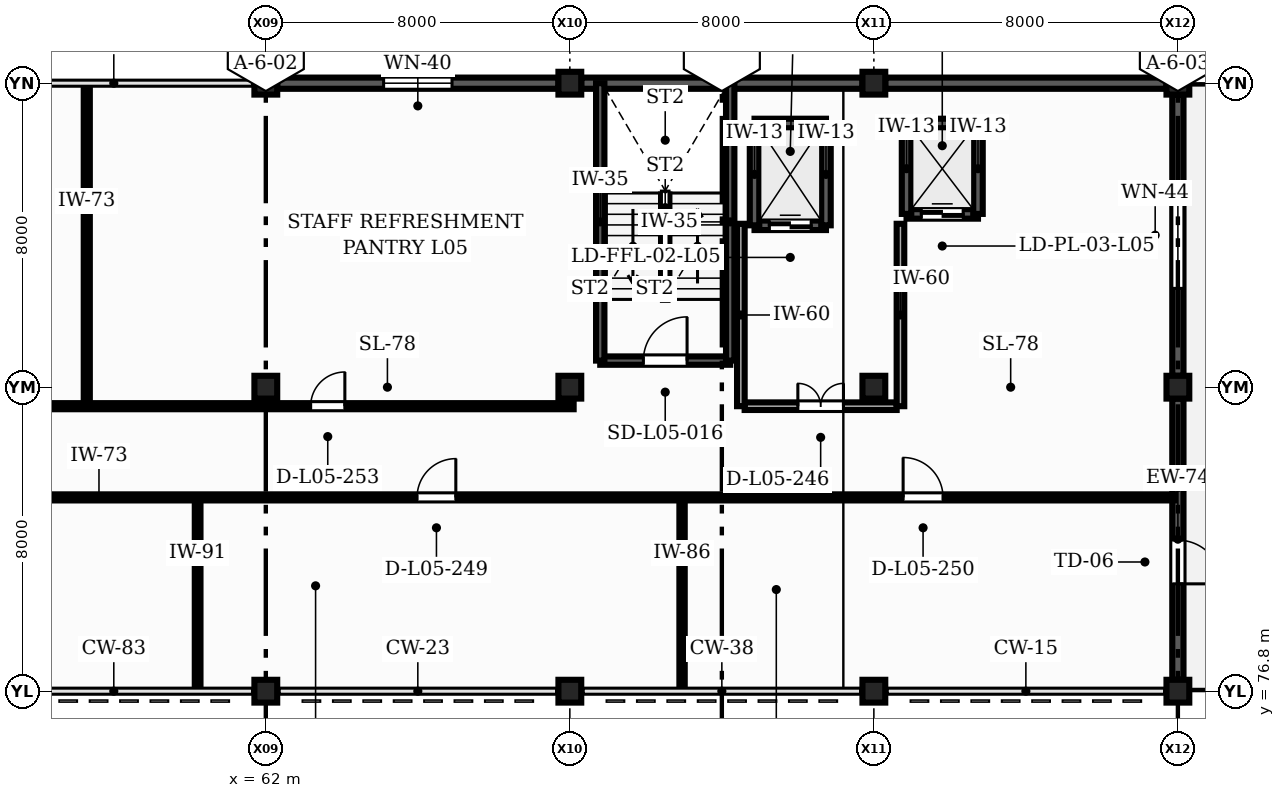
"""IFC4 building model, lengths in metres.
Left out: names, types, materials, properties, quantities, classifications, styles, units other than length and angle.
Written with IfcOpenShell. Run it as: python <this file> out.ifc"""

import sys

from ifc_helpers import new_model, si_unit, direction, frame, frame_2d, origin, origin_2d, place, context, subcontext, project, spatial, rectangle, extrude, element, fill, save


model = new_model("IFC4")
c1 = context("Model", 3, precision=1e-05, world=origin(), true_north=direction((0.0, 1.0)))
c2 = subcontext(c1, "Body", "Model", "MODEL_VIEW")
j1 = project(units=[si_unit("LENGTHUNIT", "METRE"), si_unit("PLANEANGLEUNIT", "RADIAN")], contexts=[c1])
p1 = place(None, origin())
s1 = spatial("IfcSite", under=j1, at=p1, CompositionType="ELEMENT")
p2 = place(p1, origin())
s2 = spatial("IfcBuilding", under=s1, at=p2, CompositionType="ELEMENT")
p3 = place(p2, frame((0.0, 0.0, 21.9)))
s3 = spatial("IfcBuildingStorey", under=s2, at=p3, CompositionType="ELEMENT", Elevation=21.9)
for number, where, z_axis, x_axis in (
    (1, (62.0, 76.8, 0.0), (0.0, 0.0, 1.0), (1.0, 0.0, 0.0)),
    (2, (62.0, 84.8, 0.0), (0.0, 0.0, 1.0), (1.0, 0.0, 0.0)),
    (3, (62.0, 92.8, 0.0), (0.0, 0.0, 1.0), (1.0, 0.0, 0.0)),
    (4, (70.0, 76.8, 0.0), (0.0, 0.0, 1.0), (1.0, 0.0, 0.0)),
    (5, (70.0, 84.8, 0.0), (0.0, 0.0, 1.0), (1.0, 0.0, 0.0)),
    (6, (70.0, 92.8, 0.0), (0.0, 0.0, 1.0), (1.0, 0.0, 0.0)),
    (7, (78.0, 76.8, 0.0), (0.0, 0.0, 1.0), (1.0, 0.0, 0.0)),
    (8, (78.0, 84.8, 0.0), (0.0, 0.0, 1.0), (1.0, 0.0, 0.0)),
    (9, (78.0, 92.8, 0.0), (0.0, 0.0, 1.0), (1.0, 0.0, 0.0)),
    (10, (86.0, 76.8, 0.0), (0.0, 0.0, 1.0), (1.0, 0.0, 0.0)),
    (11, (86.0, 84.8, 0.0), (0.0, 0.0, 1.0), (1.0, 0.0, 0.0)),
    (12, (86.0, 92.8, 0.0), (0.0, 0.0, 1.0), (1.0, 0.0, 0.0)),
):
    element("IfcColumn", number, at=place(p3, frame(where, z_axis=z_axis, x_axis=x_axis)), inside=s3, PredefinedType="COLUMN", context=c2, shape_type="SweptSolid", body=[
        extrude(rectangle(XDim=0.6, YDim=0.6, at=origin_2d()), origin(), (0.0, 0.0, 1.0), 3.9),
    ])
p4 = place(p3, frame((86.0, 77.1, 0.0), z_axis=(0.0, 0.0, 1.0), x_axis=(0.0, 1.0, 0.0)))
e13 = element("IfcWall", 13, at=p4, inside=s3, PredefinedType="SOLIDWALL", context=c2, shape_type="SweptSolid", body=[
    extrude(rectangle(XDim=7.4, YDim=0.295, at=frame_2d((3.7, 0.0))), origin(), (0.0, 0.0, 1.0), 3.0),
])
p5 = place(p4, frame((2.525, 0.0, 0.0)))
e14 = element("IfcOpeningElement", 14, at=p5, cuts=e13, PredefinedType="OPENING", context=c2, shape_type="SweptSolid", body=[
    extrude(rectangle(XDim=1.15, YDim=2.15, at=frame_2d((0.575, 1.075))), frame((0.0, 0.157, 0.0), z_axis=(0.0, -1.0, 0.0), x_axis=(1.0, 0.0, 0.0)), (0.0, 0.0, 1.0), 0.315),
])
p6 = place(p3, frame((86.0, 85.1, 0.0), z_axis=(0.0, 0.0, 1.0), x_axis=(0.0, 1.0, 0.0)))
e15 = element("IfcWall", 15, at=p6, inside=s3, PredefinedType="SOLIDWALL", context=c2, shape_type="SweptSolid", body=[
    extrude(rectangle(XDim=7.4, YDim=0.295, at=frame_2d((3.7, 0.0))), origin(), (0.0, 0.0, 1.0), 3.0),
])
p7 = place(p6, frame((2.3, 0.0, 0.9)))
e16 = element("IfcOpeningElement", 16, at=p7, cuts=e15, PredefinedType="OPENING", context=c2, shape_type="SweptSolid", body=[
    extrude(rectangle(XDim=2.8, YDim=1.8, at=frame_2d((1.4, 0.9))), frame((0.0, 0.157, 0.0), z_axis=(0.0, -1.0, 0.0), x_axis=(1.0, 0.0, 0.0)), (0.0, 0.0, 1.0), 0.315),
])
p8 = place(p3, frame((85.7, 92.8, 0.0), z_axis=(0.0, 0.0, 1.0), x_axis=(-1.0, 0.0, 0.0)))
e17 = element("IfcWall", 17, at=p8, inside=s3, PredefinedType="SOLIDWALL", context=c2, shape_type="SweptSolid", body=[
    extrude(rectangle(XDim=7.4, YDim=0.295, at=frame_2d((3.7, 0.0))), origin(), (0.0, 0.0, 1.0), 3.0),
])
p9 = place(p3, frame((77.7, 92.8, 0.0), z_axis=(0.0, 0.0, 1.0), x_axis=(-1.0, 0.0, 0.0)))
e18 = element("IfcWall", 18, at=p9, inside=s3, PredefinedType="SOLIDWALL", context=c2, shape_type="SweptSolid", body=[
    extrude(rectangle(XDim=7.4, YDim=0.295, at=frame_2d((3.7, 0.0))), origin(), (0.0, 0.0, 1.0), 3.65),
])
p10 = place(p3, frame((69.7, 92.8, 0.0), z_axis=(0.0, 0.0, 1.0), x_axis=(-1.0, 0.0, 0.0)))
e19 = element("IfcWall", 19, at=p10, inside=s3, PredefinedType="SOLIDWALL", context=c2, shape_type="SweptSolid", body=[
    extrude(rectangle(XDim=7.4, YDim=0.295, at=frame_2d((3.7, 0.0))), origin(), (0.0, 0.0, 1.0), 3.0),
])
p11 = place(p10, frame((2.8, 0.0, 1.6)))
e20 = element("IfcOpeningElement", 20, at=p11, cuts=e19, PredefinedType="OPENING", context=c2, shape_type="SweptSolid", body=[
    extrude(rectangle(XDim=1.8, YDim=0.75, at=frame_2d((0.9, 0.375))), frame((0.0, 0.157, 0.0), z_axis=(0.0, -1.0, 0.0), x_axis=(1.0, 0.0, 0.0)), (0.0, 0.0, 1.0), 0.315),
])
p12 = place(p3, frame((70.8, 85.5, 0.0), z_axis=(0.0, 0.0, 1.0), x_axis=(1.0, 0.0, 0.0)))
e21 = element("IfcWall", 21, at=p12, inside=s3, PredefinedType="SHEAR", context=c2, shape_type="SweptSolid", body=[
    extrude(rectangle(XDim=3.42, YDim=0.22, at=frame_2d((1.71, 0.0))), origin(), (0.0, 0.0, 1.0), 3.9),
])
p13 = place(p12, frame((1.135, 0.0, 0.0)))
e22 = element("IfcOpeningElement", 22, at=p13, cuts=e21, PredefinedType="OPENING", context=c2, shape_type="SweptSolid", body=[
    extrude(rectangle(XDim=1.15, YDim=2.15, at=frame_2d((0.575, 1.075))), frame((0.0, 0.12, 0.0), z_axis=(0.0, -1.0, 0.0), x_axis=(1.0, 0.0, 0.0)), (0.0, 0.0, 1.0), 0.24),
])
for number, where, z_axis, x_axis in (
    (23, (74.22, 85.5, 0.0), (0.0, 0.0, 1.0), (0.0, 1.0, 0.0)),
    (24, (70.8, 92.8, 0.0), (0.0, 0.0, 1.0), (0.0, -1.0, 0.0)),
):
    element("IfcWall", number, at=place(p3, frame(where, z_axis=z_axis, x_axis=x_axis)), inside=s3, PredefinedType="SHEAR", context=c2, shape_type="SweptSolid", body=[
        extrude(rectangle(XDim=7.3, YDim=0.22, at=frame_2d((3.65, 0.0))), origin(), (0.0, 0.0, 1.0), 3.9),
    ])
p14 = place(p3, frame((74.86, 89.06, 0.0), z_axis=(0.0, 0.0, 1.0), x_axis=(1.0, 0.0, 0.0)))
e25 = element("IfcWall", 25, at=p14, inside=s3, PredefinedType="SHEAR", context=c2, shape_type="SweptSolid", body=[
    extrude(rectangle(XDim=1.88, YDim=0.25, at=frame_2d((0.94, 0.0))), origin(), (0.0, 0.0, 1.0), 3.9),
])
p15 = place(p14, frame((0.39, 0.0, 0.0)))
e26 = element("IfcOpeningElement", 26, at=p15, cuts=e25, PredefinedType="OPENING", context=c2, shape_type="SweptSolid", body=[
    extrude(rectangle(XDim=1.1, YDim=2.2, at=frame_2d((0.55, 1.1))), frame((0.0, 0.135, 0.0), z_axis=(0.0, -1.0, 0.0), x_axis=(1.0, 0.0, 0.0)), (0.0, 0.0, 1.0), 0.27),
])
p16 = place(p3, frame((76.74, 89.06, 0.0), z_axis=(0.0, 0.0, 1.0), x_axis=(0.0, 1.0, 0.0)))
e27 = element("IfcWall", 27, at=p16, inside=s3, PredefinedType="SHEAR", context=c2, shape_type="SweptSolid", body=[
    extrude(rectangle(XDim=2.68, YDim=0.25, at=frame_2d((1.34, 0.0))), origin(), (0.0, 0.0, 1.0), 3.9),
])
p17 = place(p3, frame((76.74, 91.74, 0.0), z_axis=(0.0, 0.0, 1.0), x_axis=(-1.0, 0.0, 0.0)))
e28 = element("IfcWall", 28, at=p17, inside=s3, PredefinedType="SHEAR", context=c2, shape_type="SweptSolid", body=[
    extrude(rectangle(XDim=1.88, YDim=0.25, at=frame_2d((0.94, 0.0))), origin(), (0.0, 0.0, 1.0), 3.9),
])
p18 = place(p3, frame((74.86, 91.74, 0.0), z_axis=(0.0, 0.0, 1.0), x_axis=(0.0, -1.0, 0.0)))
e29 = element("IfcWall", 29, at=p18, inside=s3, PredefinedType="SHEAR", context=c2, shape_type="SweptSolid", body=[
    extrude(rectangle(XDim=2.68, YDim=0.25, at=frame_2d((1.34, 0.0))), origin(), (0.0, 0.0, 1.0), 3.9),
])
p19 = place(p3, frame((78.86, 89.36, 0.0), z_axis=(0.0, 0.0, 1.0), x_axis=(1.0, 0.0, 0.0)))
e30 = element("IfcWall", 30, at=p19, inside=s3, PredefinedType="SHEAR", context=c2, shape_type="SweptSolid", body=[
    extrude(rectangle(XDim=1.88, YDim=0.25, at=frame_2d((0.94, 0.0))), origin(), (0.0, 0.0, 1.0), 3.9),
])
p20 = place(p19, frame((0.39, 0.0, 0.0)))
e31 = element("IfcOpeningElement", 31, at=p20, cuts=e30, PredefinedType="OPENING", context=c2, shape_type="SweptSolid", body=[
    extrude(rectangle(XDim=1.1, YDim=2.2, at=frame_2d((0.55, 1.1))), frame((0.0, 0.135, 0.0), z_axis=(0.0, -1.0, 0.0), x_axis=(1.0, 0.0, 0.0)), (0.0, 0.0, 1.0), 0.27),
])
p21 = place(p3, frame((80.74, 89.36, 0.0), z_axis=(0.0, 0.0, 1.0), x_axis=(0.0, 1.0, 0.0)))
e32 = element("IfcWall", 32, at=p21, inside=s3, PredefinedType="SHEAR", context=c2, shape_type="SweptSolid", body=[
    extrude(rectangle(XDim=2.38, YDim=0.25, at=frame_2d((1.19, 0.0))), origin(), (0.0, 0.0, 1.0), 3.9),
])
p22 = place(p3, frame((80.74, 91.74, 0.0), z_axis=(0.0, 0.0, 1.0), x_axis=(-1.0, 0.0, 0.0)))
e33 = element("IfcWall", 33, at=p22, inside=s3, PredefinedType="SHEAR", context=c2, shape_type="SweptSolid", body=[
    extrude(rectangle(XDim=1.88, YDim=0.25, at=frame_2d((0.94, 0.0))), origin(), (0.0, 0.0, 1.0), 3.9),
])
p23 = place(p3, frame((78.86, 91.74, 0.0), z_axis=(0.0, 0.0, 1.0), x_axis=(0.0, -1.0, 0.0)))
e34 = element("IfcWall", 34, at=p23, inside=s3, PredefinedType="SHEAR", context=c2, shape_type="SweptSolid", body=[
    extrude(rectangle(XDim=2.38, YDim=0.25, at=frame_2d((1.19, 0.0))), origin(), (0.0, 0.0, 1.0), 3.9),
])
p24 = place(p3, frame((74.6, 84.3, 0.0), z_axis=(0.0, 0.0, 1.0), x_axis=(1.0, 0.0, 0.0)))
e35 = element("IfcWall", 35, at=p24, inside=s3, PredefinedType="PARTITIONING", context=c2, shape_type="SweptSolid", body=[
    extrude(rectangle(XDim=4.0, YDim=0.2, at=frame_2d((2.0, 0.0))), origin(), (0.0, 0.0, 1.0), 2.785),
])
p25 = place(p24, frame((1.4, 0.0, 0.0)))
e36 = element("IfcOpeningElement", 36, at=p25, cuts=e35, PredefinedType="OPENING", context=c2, shape_type="SweptSolid", body=[
    extrude(rectangle(XDim=1.2, YDim=2.15, at=frame_2d((0.6, 1.075))), frame((0.0, 0.11, 0.0), z_axis=(0.0, -1.0, 0.0), x_axis=(1.0, 0.0, 0.0)), (0.0, 0.0, 1.0), 0.22),
])
p26 = place(p3, frame((74.5, 84.3, 0.0), z_axis=(0.0, 0.0, 1.0), x_axis=(0.0, 1.0, 0.0)))
e37 = element("IfcWall", 37, at=p26, inside=s3, PredefinedType="PARTITIONING", context=c2, shape_type="SweptSolid", body=[
    extrude(rectangle(XDim=4.8, YDim=0.2, at=frame_2d((2.4, 0.0))), origin(), (0.0, 0.0, 1.0), 2.985),
])
p27 = place(p3, frame((78.7, 84.3, 0.0), z_axis=(0.0, 0.0, 1.0), x_axis=(0.0, 1.0, 0.0)))
e38 = element("IfcWall", 38, at=p27, inside=s3, PredefinedType="PARTITIONING", context=c2, shape_type="SweptSolid", body=[
    extrude(rectangle(XDim=4.8, YDim=0.2, at=frame_2d((2.4, 0.0))), origin(), (0.0, 0.0, 1.0), 3.035),
])
p28 = place(p3, frame((60.206, 76.88, 0.0), z_axis=(0.0, 0.0, 1.0), x_axis=(0.0, 1.0, 0.0)))
e39 = element("IfcWall", 39, at=p28, inside=s3, PredefinedType="PARTITIONING", context=c2, shape_type="SweptSolid", body=[
    extrude(rectangle(XDim=4.92, YDim=0.15, at=frame_2d((2.46, 0.0))), origin(), (0.0, 0.0, 1.0), 2.985),
])
p29 = place(p3, frame((72.953, 76.88, 0.0), z_axis=(0.0, 0.0, 1.0), x_axis=(0.0, 1.0, 0.0)))
e40 = element("IfcWall", 40, at=p29, inside=s3, PredefinedType="PARTITIONING", context=c2, shape_type="SweptSolid", body=[
    extrude(rectangle(XDim=4.92, YDim=0.14, at=frame_2d((2.46, 0.0))), origin(), (0.0, 0.0, 1.0), 2.985),
])
p30 = place(p3, frame((29.3, 81.9, 0.0), z_axis=(0.0, 0.0, 1.0), x_axis=(1.0, 0.0, 0.0)))
e41 = element("IfcWall", 41, at=p30, inside=s3, PredefinedType="PARTITIONING", context=c2, shape_type="SweptSolid", body=[
    extrude(rectangle(XDim=56.62, YDim=0.16, at=frame_2d((28.31, 0.0))), origin(), (0.0, 0.0, 1.0), 2.785),
])
p31 = place(p30, frame((7.43, 0.0, 0.0)))
e42 = element("IfcOpeningElement", 42, at=p31, cuts=e41, PredefinedType="OPENING", context=c2, shape_type="SweptSolid", body=[
    extrude(rectangle(XDim=0.98, YDim=2.12, at=frame_2d((0.49, 1.06))), frame((0.0, 0.09, 0.0), z_axis=(0.0, -1.0, 0.0), x_axis=(1.0, 0.0, 0.0)), (0.0, 0.0, 1.0), 0.18),
])
p32 = place(p30, frame((22.87, 0.0, 0.0)))
e43 = element("IfcOpeningElement", 43, at=p32, cuts=e41, PredefinedType="OPENING", context=c2, shape_type="SweptSolid", body=[
    extrude(rectangle(XDim=1.0, YDim=2.1, at=frame_2d((0.5, 1.05))), frame((0.0, 0.09, 0.0), z_axis=(0.0, -1.0, 0.0), x_axis=(1.0, 0.0, 0.0)), (0.0, 0.0, 1.0), 0.18),
])
p33 = place(p30, frame((36.68, 0.0, 0.0)))
e44 = element("IfcOpeningElement", 44, at=p33, cuts=e41, PredefinedType="OPENING", context=c2, shape_type="SweptSolid", body=[
    extrude(rectangle(XDim=1.02, YDim=2.12, at=frame_2d((0.51, 1.06))), frame((0.0, 0.09, 0.0), z_axis=(0.0, -1.0, 0.0), x_axis=(1.0, 0.0, 0.0)), (0.0, 0.0, 1.0), 0.18),
])
p34 = place(p30, frame((49.47, 0.0, 0.0)))
e45 = element("IfcOpeningElement", 45, at=p34, cuts=e41, PredefinedType="OPENING", context=c2, shape_type="SweptSolid", body=[
    extrude(rectangle(XDim=1.05, YDim=2.1, at=frame_2d((0.525, 1.05))), frame((0.0, 0.09, 0.0), z_axis=(0.0, -1.0, 0.0), x_axis=(1.0, 0.0, 0.0)), (0.0, 0.0, 1.0), 0.18),
])
p35 = place(p3, frame((57.289, 84.5, 0.0), z_axis=(0.0, 0.0, 1.0), x_axis=(0.0, 1.0, 0.0)))
e46 = element("IfcWall", 46, at=p35, inside=s3, PredefinedType="PARTITIONING", context=c2, shape_type="SweptSolid", body=[
    extrude(rectangle(XDim=8.22, YDim=0.16, at=frame_2d((4.11, 0.0))), origin(), (0.0, 0.0, 1.0), 2.885),
])
p36 = place(p3, frame((34.7, 84.3, 0.0), z_axis=(0.0, 0.0, 1.0), x_axis=(1.0, 0.0, 0.0)))
e47 = element("IfcWall", 47, at=p36, inside=s3, PredefinedType="PARTITIONING", context=c2, shape_type="SweptSolid", body=[
    extrude(rectangle(XDim=35.4, YDim=0.16, at=frame_2d((17.7, 0.0))), origin(), (0.0, 0.0, 1.0), 2.785),
])
p37 = place(p36, frame((5.92, 0.0, 0.0)))
e48 = element("IfcOpeningElement", 48, at=p37, cuts=e47, PredefinedType="OPENING", context=c2, shape_type="SweptSolid", body=[
    extrude(rectangle(XDim=1.08, YDim=2.14, at=frame_2d((0.54, 1.07))), frame((0.0, 0.09, 0.0), z_axis=(0.0, -1.0, 0.0), x_axis=(1.0, 0.0, 0.0)), (0.0, 0.0, 1.0), 0.18),
])
p38 = place(p36, frame((17.2, 0.0, 0.0)))
e49 = element("IfcOpeningElement", 49, at=p38, cuts=e47, PredefinedType="OPENING", context=c2, shape_type="SweptSolid", body=[
    extrude(rectangle(XDim=0.95, YDim=2.15, at=frame_2d((0.475, 1.075))), frame((0.0, 0.09, 0.0), z_axis=(0.0, -1.0, 0.0), x_axis=(1.0, 0.0, 0.0)), (0.0, 0.0, 1.0), 0.18),
])
p39 = place(p36, frame((28.48, 0.0, 0.0)))
e50 = element("IfcOpeningElement", 50, at=p39, cuts=e47, PredefinedType="OPENING", context=c2, shape_type="SweptSolid", body=[
    extrude(rectangle(XDim=0.9, YDim=2.1, at=frame_2d((0.45, 1.05))), frame((0.0, 0.09, 0.0), z_axis=(0.0, -1.0, 0.0), x_axis=(1.0, 0.0, 0.0)), (0.0, 0.0, 1.0), 0.18),
])
p40 = place(p5, frame((1.15, 0.0, 0.0), z_axis=(0.0, 0.0, 1.0), x_axis=(-1.0, 0.0, 0.0)))
e51 = element("IfcDoor", 51, at=p40, inside=s3, OperationType="SINGLE_SWING_RIGHT", PredefinedType="DOOR", context=c2, shape_type="SweptSolid", body=[
    extrude(rectangle(XDim=1.15, YDim=2.15, at=frame_2d((0.575, 1.075))), frame((0.0, 0.025, 0.0), z_axis=(0.0, -1.0, 0.0), x_axis=(1.0, 0.0, 0.0)), (0.0, 0.0, 1.0), 0.05),
])
fill(e14, e51)
p41 = place(p7, origin())
e52 = element("IfcWindow", 52, at=p41, inside=s3, PartitioningType="SINGLE_PANEL", PredefinedType="WINDOW", context=c2, shape_type="SweptSolid", body=[
    extrude(rectangle(XDim=2.8, YDim=1.8, at=frame_2d((1.4, 0.9))), frame((0.0, 0.03, 0.0), z_axis=(0.0, -1.0, 0.0), x_axis=(1.0, 0.0, 0.0)), (0.0, 0.0, 1.0), 0.06),
])
fill(e16, e52)
p42 = place(p11, origin())
e53 = element("IfcWindow", 53, at=p42, inside=s3, PartitioningType="SINGLE_PANEL", PredefinedType="WINDOW", context=c2, shape_type="SweptSolid", body=[
    extrude(rectangle(XDim=1.8, YDim=0.75, at=frame_2d((0.9, 0.375))), frame((0.0, 0.03, 0.0), z_axis=(0.0, -1.0, 0.0), x_axis=(1.0, 0.0, 0.0)), (0.0, 0.0, 1.0), 0.06),
])
fill(e20, e53)
p43 = place(p13, origin())
e54 = element("IfcDoor", 54, at=p43, inside=s3, OperationType="SINGLE_SWING_RIGHT", PredefinedType="DOOR", context=c2, shape_type="SweptSolid", body=[
    extrude(rectangle(XDim=1.15, YDim=2.15, at=frame_2d((0.575, 1.075))), frame((0.0, 0.025, 0.0), z_axis=(0.0, -1.0, 0.0), x_axis=(1.0, 0.0, 0.0)), (0.0, 0.0, 1.0), 0.05),
])
fill(e22, e54)
p44 = place(p15, origin())
e55 = element("IfcDoor", 55, at=p44, inside=s3, OperationType="DOUBLE_DOOR_SLIDING", PredefinedType="DOOR", context=c2, shape_type="SweptSolid", body=[
    extrude(rectangle(XDim=1.1, YDim=2.2, at=frame_2d((0.55, 1.1))), frame((0.0, 0.025, 0.0), z_axis=(0.0, -1.0, 0.0), x_axis=(1.0, 0.0, 0.0)), (0.0, 0.0, 1.0), 0.05),
])
fill(e26, e55)
p45 = place(p20, origin())
e56 = element("IfcDoor", 56, at=p45, inside=s3, OperationType="DOUBLE_DOOR_SLIDING", PredefinedType="DOOR", context=c2, shape_type="SweptSolid", body=[
    extrude(rectangle(XDim=1.1, YDim=2.2, at=frame_2d((0.55, 1.1))), frame((0.0, 0.025, 0.0), z_axis=(0.0, -1.0, 0.0), x_axis=(1.0, 0.0, 0.0)), (0.0, 0.0, 1.0), 0.05),
])
fill(e31, e56)
p46 = place(p25, origin())
e57 = element("IfcDoor", 57, at=p46, inside=s3, OperationType="DOUBLE_DOOR_SINGLE_SWING", PredefinedType="DOOR", context=c2, shape_type="SweptSolid", body=[
    extrude(rectangle(XDim=1.2, YDim=2.15, at=frame_2d((0.6, 1.075))), frame((0.0, 0.025, 0.0), z_axis=(0.0, -1.0, 0.0), x_axis=(1.0, 0.0, 0.0)), (0.0, 0.0, 1.0), 0.05),
])
fill(e36, e57)
p47 = place(p33, origin())
e58 = element("IfcDoor", 58, at=p47, inside=s3, OperationType="SINGLE_SWING_RIGHT", PredefinedType="DOOR", context=c2, shape_type="SweptSolid", body=[
    extrude(rectangle(XDim=1.02, YDim=2.12, at=frame_2d((0.51, 1.06))), frame((0.0, 0.025, 0.0), z_axis=(0.0, -1.0, 0.0), x_axis=(1.0, 0.0, 0.0)), (0.0, 0.0, 1.0), 0.05),
])
fill(e44, e58)
p48 = place(p34, origin())
e59 = element("IfcDoor", 59, at=p48, inside=s3, OperationType="SINGLE_SWING_LEFT", PredefinedType="DOOR", context=c2, shape_type="SweptSolid", body=[
    extrude(rectangle(XDim=1.05, YDim=2.1, at=frame_2d((0.525, 1.05))), frame((0.0, 0.025, 0.0), z_axis=(0.0, -1.0, 0.0), x_axis=(1.0, 0.0, 0.0)), (0.0, 0.0, 1.0), 0.05),
])
fill(e45, e59)
p49 = place(p39, origin())
e60 = element("IfcDoor", 60, at=p49, inside=s3, OperationType="SINGLE_SWING_RIGHT", PredefinedType="DOOR", context=c2, shape_type="SweptSolid", body=[
    extrude(rectangle(XDim=0.9, YDim=2.1, at=frame_2d((0.45, 1.05))), frame((0.0, 0.025, 0.0), z_axis=(0.0, -1.0, 0.0), x_axis=(1.0, 0.0, 0.0)), (0.0, 0.0, 1.0), 0.05),
])
fill(e50, e60)
save(model, sys.argv[1])
